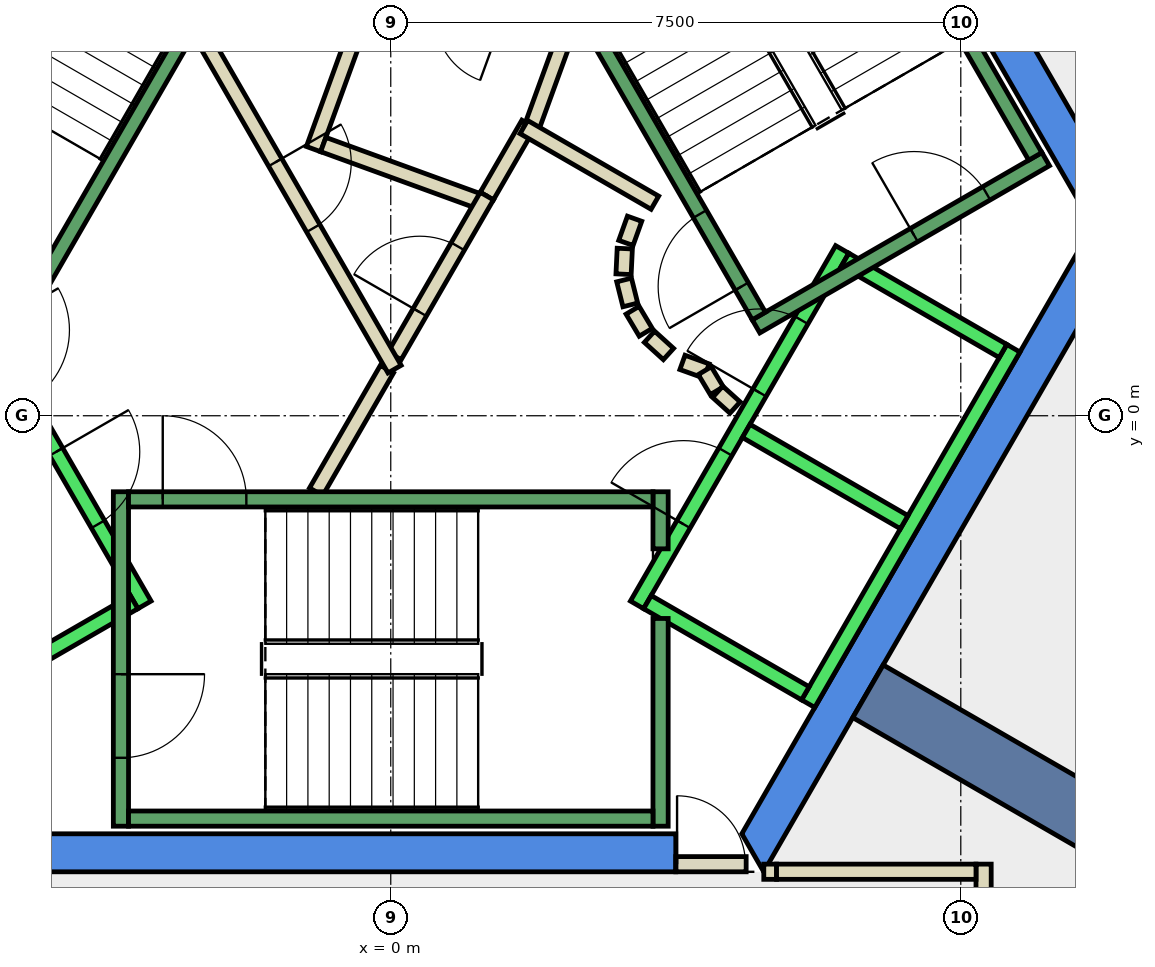
"""IFC4 building model, lengths in metres.
Left out: names, types, materials, properties, quantities, classifications, styles, units other than length and angle.
Written with IfcOpenShell. Run it as: python <this file> out.ifc"""

import sys

from ifc_helpers import new_model, si_unit, direction, frame, frame_2d, origin, place, context, subcontext, project, spatial, polyline, rectangle, outline, extrude, element, fill, save


model = new_model("IFC4")
c1 = context("Model", 3, precision=1e-05, world=origin(), true_north=direction((0.0, 1.0)))
c2 = subcontext(c1, "Body", "Model", "MODEL_VIEW")
j1 = project(units=[si_unit("LENGTHUNIT", "METRE"), si_unit("PLANEANGLEUNIT", "RADIAN")], contexts=[c1])
p1 = place(None, origin())
s1 = spatial("IfcSite", under=j1, at=p1, CompositionType="ELEMENT")
p2 = place(p1, origin())
s2 = spatial("IfcBuilding", under=s1, at=p2, CompositionType="ELEMENT")
p3 = place(p2, frame((0.0, 0.0, 290.0)))
s3 = spatial("IfcBuildingStorey", under=s2, at=p3, CompositionType="ELEMENT", Elevation=290.0)
p4 = place(p3, frame((0.0, 0.0, -0.34)))
e1 = element("IfcWall", 1, at=p4, inside=s3, PredefinedType="SHEAR", context=c2, shape_type="SweptSolid", body=[
    extrude(outline(polyline([(5.486, 9.998), (5.053, 9.748), (9.238, 2.5), (9.815, 2.5), (5.486, 9.998)])), origin(), (0.0, 0.0, 1.0), 3.6),
])
p5 = place(p3, frame((0.0, 0.0, -0.34)))
e2 = element("IfcWall", 2, at=p5, inside=s3, PredefinedType="SHEAR", context=c2, shape_type="SweptSolid", body=[
    extrude(outline(polyline([(3.75, -6.0), (3.75, -5.5), (-4.619, -5.5), (-4.907, -6.0), (3.75, -6.0)])), origin(), (0.0, 0.0, 1.0), 3.6),
])
p6 = place(p3, frame((0.0, 0.0, -0.34)))
e3 = element("IfcWall", 3, at=p6, inside=s3, PredefinedType="SHEAR", context=c2, shape_type="SweptSolid", body=[
    extrude(outline(polyline([(4.907, -6.0), (9.815, 2.5), (9.238, 2.5), (4.619, -5.5), (4.907, -6.0)])), origin(), (0.0, 0.0, 1.0), 3.6),
])
p7 = place(p3, frame((6.279, -3.625, -0.34), z_axis=(0.0, 0.0, 1.0), x_axis=(0.866017533419, -0.500013631625, 0.0)))
e4 = element("IfcWall", 4, at=p7, inside=s3, PredefinedType="SHEAR", context=c2, shape_type="SweptSolid", body=[
    extrude(rectangle(XDim=9.0, YDim=0.8, at=frame_2d((4.5, 0.0))), origin(), (0.0, 0.0, 1.0), 3.6),
])
p8 = place(p3, frame((1.264, 2.89, 0.0), z_axis=(0.0, 0.0, 1.0), x_axis=(0.500043792738, 0.866000118559, 0.0)))
e5 = element("IfcWall", 5, at=p8, inside=s3, PredefinedType="PARTITIONING", context=c2, shape_type="SweptSolid", body=[
    extrude(rectangle(XDim=1.096, YDim=0.2, at=frame_2d((0.548, 0.0))), origin(), (0.0, 0.0, 1.0), 3.26),
])
p9 = place(p3, frame((1.838, 3.748, 0.0), z_axis=(0.0, 0.0, 1.0), x_axis=(0.342266462435, 0.939602931398, 0.0)))
e6 = element("IfcWall", 6, at=p9, inside=s3, PredefinedType="PARTITIONING", context=c2, shape_type="SweptSolid", body=[
    extrude(rectangle(XDim=1.198, YDim=0.2, at=frame_2d((0.599, 0.0))), origin(), (0.0, 0.0, 1.0), 3.26),
])
p10 = place(p3, frame((-0.196, 5.764, 0.0), z_axis=(0.0, 0.0, 1.0), x_axis=(-0.34165322761, -0.939826086073, 0.0)))
e7 = element("IfcWall", 7, at=p10, inside=s3, PredefinedType="PARTITIONING", context=c2, shape_type="SweptSolid", body=[
    extrude(rectangle(XDim=2.4, YDim=0.2, at=frame_2d((1.2, 0.0))), origin(), (0.0, 0.0, 1.0), 3.26),
])
p11 = place(p3, frame((-0.888, 3.568, 0.0), z_axis=(0.0, 0.0, 1.0), x_axis=(0.939685034098, -0.34204098686, 0.0)))
e8 = element("IfcWall", 8, at=p11, inside=s3, PredefinedType="PARTITIONING", context=c2, shape_type="SweptSolid", body=[
    extrude(rectangle(XDim=2.237, YDim=0.2, at=frame_2d((1.119, 0.0))), origin(), (0.0, 0.0, 1.0), 3.26),
])
p12 = place(p3, frame((-0.982, -1.0, 0.0), z_axis=(0.0, 0.0, 1.0), x_axis=(0.50024047865, 0.865886518847, 0.0)))
e9 = element("IfcWall", 9, at=p12, inside=s3, PredefinedType="PARTITIONING", context=c2, shape_type="SweptSolid", body=[
    extrude(rectangle(XDim=1.863, YDim=0.2, at=frame_2d((0.931, 0.0))), origin(), (0.0, 0.0, 1.0), 3.26),
])
p13 = place(p3, frame((0.05, 0.787, 0.0), z_axis=(0.0, 0.0, 1.0), x_axis=(0.499945861543, 0.866056658381, 0.0)))
e10 = element("IfcWall", 10, at=p13, inside=s3, PredefinedType="PARTITIONING", context=c2, shape_type="SweptSolid", body=[
    extrude(rectangle(XDim=2.428, YDim=0.2, at=frame_2d((1.214, 0.0))), origin(), (0.0, 0.0, 1.0), 3.26),
])
p14 = place(p13, frame((0.664, 0.0, 0.0)))
e11 = element("IfcOpeningElement", 11, at=p14, cuts=e10, PredefinedType="OPENING", context=c2, shape_type="SweptSolid", body=[
    extrude(rectangle(XDim=1.0, YDim=2.1, at=frame_2d((0.5, 1.05))), frame((0.0, 0.11, 0.0), z_axis=(0.0, -1.0, 0.0), x_axis=(1.0, 0.0, 0.0)), (0.0, 0.0, 1.0), 0.22),
])
p15 = place(p3, frame((1.751, 3.798, 0.0), z_axis=(0.0, 0.0, 1.0), x_axis=(0.866091650241, -0.499885240213, 0.0)))
e12 = element("IfcWall", 12, at=p15, inside=s3, PredefinedType="PARTITIONING", context=c2, shape_type="SweptSolid", body=[
    extrude(rectangle(XDim=1.991, YDim=0.2, at=frame_2d((0.995, 0.0))), origin(), (0.0, 0.0, 1.0), 3.26),
])
p16 = place(p3, frame((3.208, 2.592, 0.0), z_axis=(0.0, 0.0, 1.0), x_axis=(-0.337388820924, -0.941365382578, 0.0)))
e13 = element("IfcWall", 13, at=p16, inside=s3, PredefinedType="PARTITIONING", context=c2, shape_type="SweptSolid", body=[
    extrude(rectangle(XDim=0.338, YDim=0.2, at=frame_2d((0.169, 0.0))), origin(), (0.0, 0.0, 1.0), 3.26),
])
p17 = place(p3, frame((3.079, 2.199, 0.0), z_axis=(0.0, 0.0, 1.0), x_axis=(-0.047771483479, -0.998858290933, 0.0)))
e14 = element("IfcWall", 14, at=p17, inside=s3, PredefinedType="PARTITIONING", context=c2, shape_type="SweptSolid", body=[
    extrude(rectangle(XDim=0.337, YDim=0.2, at=frame_2d((0.169, 0.0))), origin(), (0.0, 0.0, 1.0), 3.26),
])
p18 = place(p3, frame((3.07, 1.786, 0.0), z_axis=(0.0, 0.0, 1.0), x_axis=(0.242705583207, -0.970099994784, 0.0)))
e15 = element("IfcWall", 15, at=p18, inside=s3, PredefinedType="PARTITIONING", context=c2, shape_type="SweptSolid", body=[
    extrude(rectangle(XDim=0.338, YDim=0.2, at=frame_2d((0.169, 0.0))), origin(), (0.0, 0.0, 1.0), 3.26),
])
for number, where, z_axis, x_axis in (
    (16, (3.182, 1.388, 0.0), (0.0, 0.0, 1.0), (0.512, -0.859, 0.0)),
    (17, (3.404, 1.039, 0.0), (0.0, 0.0, 1.0), (0.74, -0.672, 0.0)),
):
    element("IfcWall", number, at=place(p3, frame(where, z_axis=z_axis, x_axis=x_axis)), inside=s3, PredefinedType="PARTITIONING", context=c2, shape_type="SweptSolid", body=[
        extrude(rectangle(XDim=0.338, YDim=0.2, at=frame_2d((0.169, 0.0))), origin(), (0.0, 0.0, 1.0), 3.26),
    ])
p19 = place(p3, frame((3.838, 0.702, 0.0), z_axis=(0.0, 0.0, 1.0), x_axis=(0.941035081519, -0.338308993895, 0.0)))
e18 = element("IfcWall", 18, at=p19, inside=s3, PredefinedType="PARTITIONING", context=c2, shape_type="SweptSolid", body=[
    extrude(rectangle(XDim=0.337, YDim=0.2, at=frame_2d((0.168, 0.0))), origin(), (0.0, 0.0, 1.0), 3.26),
])
p20 = place(p3, frame((4.132, 0.593, 0.0), z_axis=(0.0, 0.0, 1.0), x_axis=(0.513561617048, -0.858052717201, 0.0)))
e19 = element("IfcWall", 19, at=p20, inside=s3, PredefinedType="PARTITIONING", context=c2, shape_type="SweptSolid", body=[
    extrude(rectangle(XDim=0.308, YDim=0.2, at=frame_2d((0.154, 0.0))), origin(), (0.0, 0.0, 1.0), 3.26),
])
p21 = place(p3, frame((4.301, 0.315, 0.0), z_axis=(0.0, 0.0, 1.0), x_axis=(0.741798017506, -0.670623367639, 0.0)))
e20 = element("IfcWall", 20, at=p21, inside=s3, PredefinedType="PARTITIONING", context=c2, shape_type="SweptSolid", body=[
    extrude(rectangle(XDim=0.309, YDim=0.2, at=frame_2d((0.154, 0.0))), origin(), (0.0, 0.0, 1.0), 3.26),
])
p22 = place(p3, frame((-2.54, 5.1, 0.0), z_axis=(0.0, 0.0, 1.0), x_axis=(0.499925051871, -0.866068670783, 0.0)))
e21 = element("IfcWall", 21, at=p22, inside=s3, PredefinedType="PARTITIONING", context=c2, shape_type="SweptSolid", body=[
    extrude(rectangle(XDim=5.181, YDim=0.2, at=frame_2d((2.59, 0.0))), origin(), (0.0, 0.0, 1.0), 3.26),
])
p23 = place(p22, frame((2.04, 0.0, 0.0)))
e22 = element("IfcOpeningElement", 22, at=p23, cuts=e21, PredefinedType="OPENING", context=c2, shape_type="SweptSolid", body=[
    extrude(rectangle(XDim=1.0, YDim=2.1, at=frame_2d((0.5, 1.05))), frame((0.0, 0.11, 0.0), z_axis=(0.0, -1.0, 0.0), x_axis=(1.0, 0.0, 0.0)), (0.0, 0.0, 1.0), 0.22),
])
p24 = place(p3, frame((4.908, -5.999, 0.0), z_axis=(0.0, 0.0, 1.0), x_axis=(1.0, 0.0, 0.0)))
e23 = element("IfcWall", 23, at=p24, inside=s3, PredefinedType="PARTITIONING", context=c2, shape_type="SweptSolid", body=[
    extrude(rectangle(XDim=0.168, YDim=0.2, at=frame_2d((0.084, 0.0))), origin(), (0.0, 0.0, 1.0), 2.4),
])
p25 = place(p3, frame((7.8, -5.899, 0.0), z_axis=(0.0, 0.0, 1.0), x_axis=(0.0, -1.0, 0.0)))
e24 = element("IfcWall", 24, at=p25, inside=s3, PredefinedType="PARTITIONING", context=c2, shape_type="SweptSolid", body=[
    extrude(rectangle(XDim=3.876, YDim=0.2, at=frame_2d((1.938, 0.0))), origin(), (0.0, 0.0, 1.0), 3.26),
])
p26 = place(p3, frame((3.75, -5.9, 0.0), z_axis=(0.0, 0.0, 1.0), x_axis=(1.0, 0.0, 0.0)))
e25 = element("IfcWall", 25, at=p26, inside=s3, PredefinedType="PARTITIONING", context=c2, shape_type="SweptSolid", body=[
    extrude(rectangle(XDim=0.926, YDim=0.2, at=frame_2d((0.463, 0.0))), origin(), (0.0, 0.0, 1.0), 2.4),
])
p27 = place(p26, frame((0.017, 0.0, 0.0)))
e26 = element("IfcOpeningElement", 26, at=p27, cuts=e25, PredefinedType="OPENING", context=c2, shape_type="SweptSolid", body=[
    extrude(rectangle(XDim=0.9, YDim=2.1, at=frame_2d((0.45, 1.05))), frame((0.0, 0.11, 0.0), z_axis=(0.0, -1.0, 0.0), x_axis=(1.0, 0.0, 0.0)), (0.0, 0.0, 1.0), 0.22),
])
p28 = place(p3, frame((5.076, -5.999, 0.0), z_axis=(0.0, 0.0, 1.0), x_axis=(1.0, 0.0, 0.0)))
e27 = element("IfcWall", 27, at=p28, inside=s3, PredefinedType="PARTITIONING", context=c2, shape_type="SweptSolid", body=[
    extrude(rectangle(XDim=2.624, YDim=0.2, at=frame_2d((1.312, 0.0))), origin(), (0.0, 0.0, 1.0), 3.26),
])
p29 = place(p3, frame((-5.94, 2.188, 0.0), z_axis=(0.0, 0.0, 1.0), x_axis=(0.500034260056, -0.866005622828, 0.0)))
e28 = element("IfcWall", 28, at=p29, inside=s3, PredefinedType="STANDARD", context=c2, shape_type="SweptSolid", body=[
    extrude(rectangle(XDim=5.399, YDim=0.2, at=frame_2d((2.7, 0.0))), origin(), (0.0, 0.0, 1.0), 3.26),
])
p30 = place(p29, frame((3.075, 0.0, 0.0)))
e29 = element("IfcOpeningElement", 29, at=p30, cuts=e28, PredefinedType="OPENING", context=c2, shape_type="SweptSolid", body=[
    extrude(rectangle(XDim=1.1, YDim=2.1, at=frame_2d((0.55, 1.05))), frame((0.0, 0.11, 0.0), z_axis=(0.0, -1.0, 0.0), x_axis=(1.0, 0.0, 0.0)), (0.0, 0.0, 1.0), 0.22),
])
p31 = place(p29, frame((1.225, 0.0, 0.0)))
e30 = element("IfcOpeningElement", 30, at=p31, cuts=e28, PredefinedType="OPENING", context=c2, shape_type="SweptSolid", body=[
    extrude(rectangle(XDim=1.1, YDim=2.1, at=frame_2d((0.55, 1.05))), frame((0.0, 0.11, 0.0), z_axis=(0.0, -1.0, 0.0), x_axis=(1.0, 0.0, 0.0)), (0.0, 0.0, 1.0), 0.22),
])
p32 = place(p3, frame((-3.377, -2.452, 0.0), z_axis=(0.0, 0.0, 1.0), x_axis=(-0.865955154139, -0.50012165622, 0.0)))
e31 = element("IfcWall", 31, at=p32, inside=s3, PredefinedType="STANDARD", context=c2, shape_type="SweptSolid", body=[
    extrude(rectangle(XDim=2.4, YDim=0.2, at=frame_2d((1.2, 0.0))), origin(), (0.0, 0.0, 1.0), 3.26),
])
p33 = place(p3, frame((3.24, -2.488, 0.0), z_axis=(0.0, 0.0, 1.0), x_axis=(0.500034260056, 0.866005622828, 0.0)))
e32 = element("IfcWall", 32, at=p33, inside=s3, PredefinedType="STANDARD", context=c2, shape_type="SweptSolid", body=[
    extrude(rectangle(XDim=5.399, YDim=0.2, at=frame_2d((2.7, 0.0))), origin(), (0.0, 0.0, 1.0), 3.26),
])
p34 = place(p33, frame((3.225, 0.0, 0.0)))
e33 = element("IfcOpeningElement", 33, at=p34, cuts=e32, PredefinedType="OPENING", context=c2, shape_type="SweptSolid", body=[
    extrude(rectangle(XDim=1.1, YDim=2.1, at=frame_2d((0.55, 1.05))), frame((0.0, 0.11, 0.0), z_axis=(0.0, -1.0, 0.0), x_axis=(1.0, 0.0, 0.0)), (0.0, 0.0, 1.0), 0.22),
])
p35 = place(p33, frame((1.225, 0.0, 0.0)))
e34 = element("IfcOpeningElement", 34, at=p35, cuts=e32, PredefinedType="OPENING", context=c2, shape_type="SweptSolid", body=[
    extrude(rectangle(XDim=1.1, YDim=2.1, at=frame_2d((0.55, 1.05))), frame((0.0, 0.11, 0.0), z_axis=(0.0, -1.0, 0.0), x_axis=(1.0, 0.0, 0.0)), (0.0, 0.0, 1.0), 0.22),
])
p36 = place(p3, frame((5.492, -3.788, 0.0), z_axis=(0.0, 0.0, 1.0), x_axis=(0.500034260056, 0.866005622828, 0.0)))
e35 = element("IfcWall", 35, at=p36, inside=s3, PredefinedType="STANDARD", context=c2, shape_type="SweptSolid", body=[
    extrude(rectangle(XDim=5.399, YDim=0.2, at=frame_2d((2.7, 0.0))), origin(), (0.0, 0.0, 1.0), 3.26),
])
p37 = place(p3, frame((3.377, -2.452, 0.0), z_axis=(0.0, 0.0, 1.0), x_axis=(0.865955154139, -0.50012165622, 0.0)))
e36 = element("IfcWall", 36, at=p37, inside=s3, PredefinedType="STANDARD", context=c2, shape_type="SweptSolid", body=[
    extrude(rectangle(XDim=2.4, YDim=0.2, at=frame_2d((1.2, 0.0))), origin(), (0.0, 0.0, 1.0), 3.26),
])
for number, where, z_axis, x_axis in (
    (37, (4.677, -0.2, 0.0), (0.0, 0.0, 1.0), (0.866, -0.5, 0.0)),
    (38, (5.977, 2.052, 0.0), (0.0, 0.0, 1.0), (0.866, -0.5, 0.0)),
):
    element("IfcWall", number, at=place(p3, frame(where, z_axis=z_axis, x_axis=x_axis)), inside=s3, PredefinedType="STANDARD", context=c2, shape_type="SweptSolid", body=[
        extrude(rectangle(XDim=2.399, YDim=0.2, at=frame_2d((1.2, 0.0))), origin(), (0.0, 0.0, 1.0), 3.26),
    ])
p38 = place(p3, frame((-3.55, -1.0, 0.0), z_axis=(0.0, 0.0, 1.0), x_axis=(0.0, -1.0, 0.0)))
e39 = element("IfcWall", 39, at=p38, inside=s3, PredefinedType="STANDARD", context=c2, shape_type="SweptSolid", body=[
    extrude(rectangle(XDim=4.4, YDim=0.2, at=frame_2d((2.2, 0.0))), origin(), (0.0, 0.0, 1.0), 3.26),
])
p39 = place(p38, frame((2.4, 0.0, 0.0)))
e40 = element("IfcOpeningElement", 40, at=p39, cuts=e39, PredefinedType="OPENING", context=c2, shape_type="SweptSolid", body=[
    extrude(rectangle(XDim=1.1, YDim=2.2, at=frame_2d((0.55, 1.1))), frame((0.0, 0.11, 0.0), z_axis=(0.0, -1.0, 0.0), x_axis=(1.0, 0.0, 0.0)), (0.0, 0.0, 1.0), 0.22),
])
p40 = place(p3, frame((3.55, -2.667, 0.0), z_axis=(0.0, 0.0, 1.0), x_axis=(0.0, -1.0, 0.0)))
e41 = element("IfcWall", 41, at=p40, inside=s3, PredefinedType="STANDARD", context=c2, shape_type="SweptSolid", body=[
    extrude(rectangle(XDim=2.733, YDim=0.2, at=frame_2d((1.366, 0.0))), origin(), (0.0, 0.0, 1.0), 3.26),
])
p41 = place(p3, frame((3.55, -1.0, 0.0), z_axis=(0.0, 0.0, 1.0), x_axis=(0.0, -1.0, 0.0)))
e42 = element("IfcWall", 42, at=p41, inside=s3, PredefinedType="STANDARD", context=c2, shape_type="SweptSolid", body=[
    extrude(rectangle(XDim=0.751, YDim=0.2, at=frame_2d((0.375, 0.0))), origin(), (0.0, 0.0, 1.0), 3.26),
])
p42 = place(p3, frame((-3.45, -1.1, 0.0), z_axis=(0.0, 0.0, 1.0), x_axis=(1.0, 0.0, 0.0)))
e43 = element("IfcWall", 43, at=p42, inside=s3, PredefinedType="STANDARD", context=c2, shape_type="SweptSolid", body=[
    extrude(rectangle(XDim=6.9, YDim=0.2, at=frame_2d((3.45, 0.0))), origin(), (0.0, 0.0, 1.0), 3.26),
])
p43 = place(p42, frame((0.45, 0.0, 0.0)))
e44 = element("IfcOpeningElement", 44, at=p43, cuts=e43, PredefinedType="OPENING", context=c2, shape_type="SweptSolid", body=[
    extrude(rectangle(XDim=1.1, YDim=2.2, at=frame_2d((0.55, 1.1))), frame((0.0, 0.11, 0.0), z_axis=(0.0, -1.0, 0.0), x_axis=(1.0, 0.0, 0.0)), (0.0, 0.0, 1.0), 0.22),
])
p44 = place(p3, frame((-3.45, -5.3, 0.0), z_axis=(0.0, 0.0, 1.0), x_axis=(1.0, 0.0, 0.0)))
e45 = element("IfcWall", 45, at=p44, inside=s3, PredefinedType="STANDARD", context=c2, shape_type="SweptSolid", body=[
    extrude(rectangle(XDim=6.9, YDim=0.2, at=frame_2d((3.45, 0.0))), origin(), (0.0, 0.0, 1.0), 3.26),
])
p45 = place(p3, frame((4.806, 1.176, 0.0), z_axis=(0.0, 0.0, 1.0), x_axis=(0.866059941101, 0.499940174841, 0.0)))
e46 = element("IfcWall", 46, at=p45, inside=s3, PredefinedType="STANDARD", context=c2, shape_type="SweptSolid", body=[
    extrude(rectangle(XDim=4.4, YDim=0.2, at=frame_2d((2.2, 0.0))), origin(), (0.0, 0.0, 1.0), 3.26),
])
p46 = place(p45, frame((2.4, 0.0, 0.0)))
e47 = element("IfcOpeningElement", 47, at=p46, cuts=e46, PredefinedType="OPENING", context=c2, shape_type="SweptSolid", body=[
    extrude(rectangle(XDim=1.1, YDim=2.2, at=frame_2d((0.55, 1.1))), frame((0.0, 0.11, 0.0), z_axis=(0.0, -1.0, 0.0), x_axis=(1.0, 0.0, 0.0)), (0.0, 0.0, 1.0), 0.22),
])
p47 = place(p3, frame((4.843, 1.312, 0.0), z_axis=(0.0, 0.0, 1.0), x_axis=(-0.499963383562, 0.866046543262, 0.0)))
e48 = element("IfcWall", 48, at=p47, inside=s3, PredefinedType="STANDARD", context=c2, shape_type="SweptSolid", body=[
    extrude(rectangle(XDim=6.9, YDim=0.2, at=frame_2d((3.45, 0.0))), origin(), (0.0, 0.0, 1.0), 3.26),
])
p48 = place(p47, frame((0.45, 0.0, 0.0)))
e49 = element("IfcOpeningElement", 49, at=p48, cuts=e48, PredefinedType="OPENING", context=c2, shape_type="SweptSolid", body=[
    extrude(rectangle(XDim=1.1, YDim=2.2, at=frame_2d((0.55, 1.1))), frame((0.0, 0.11, 0.0), z_axis=(0.0, -1.0, 0.0), x_axis=(1.0, 0.0, 0.0)), (0.0, 0.0, 1.0), 0.22),
])
p49 = place(p3, frame((8.48, 3.412, 0.0), z_axis=(0.0, 0.0, 1.0), x_axis=(-0.499978703459, 0.866037698999, 0.0)))
e50 = element("IfcWall", 50, at=p49, inside=s3, PredefinedType="STANDARD", context=c2, shape_type="SweptSolid", body=[
    extrude(rectangle(XDim=6.9, YDim=0.2, at=frame_2d((3.45, 0.0))), origin(), (0.0, 0.0, 1.0), 3.26),
])
p50 = place(p3, frame((-1.393, 7.288, 0.0), z_axis=(0.0, 0.0, 1.0), x_axis=(-0.499963383562, -0.866046543262, 0.0)))
e51 = element("IfcWall", 51, at=p50, inside=s3, PredefinedType="STANDARD", context=c2, shape_type="SweptSolid", body=[
    extrude(rectangle(XDim=6.9, YDim=0.2, at=frame_2d((3.45, 0.0))), origin(), (0.0, 0.0, 1.0), 3.26),
])
p51 = place(p50, frame((0.45, 0.0, 0.0)))
e52 = element("IfcOpeningElement", 52, at=p51, cuts=e51, PredefinedType="OPENING", context=c2, shape_type="SweptSolid", body=[
    extrude(rectangle(XDim=1.1, YDim=2.2, at=frame_2d((0.55, 1.1))), frame((0.0, 0.11, 0.0), z_axis=(0.0, -1.0, 0.0), x_axis=(1.0, 0.0, 0.0)), (0.0, 0.0, 1.0), 0.22),
])
p52 = place(p14, origin())
e53 = element("IfcDoor", 53, at=p52, inside=s3, OperationType="SINGLE_SWING_RIGHT", PredefinedType="DOOR", context=c2, shape_type="SweptSolid", body=[
    extrude(rectangle(XDim=1.0, YDim=2.1, at=frame_2d((0.5, 1.05))), frame((0.0, 0.025, 0.0), z_axis=(0.0, -1.0, 0.0), x_axis=(1.0, 0.0, 0.0)), (0.0, 0.0, 1.0), 0.05),
])
fill(e11, e53)
p53 = place(p23, origin())
e54 = element("IfcDoor", 54, at=p53, inside=s3, OperationType="SINGLE_SWING_RIGHT", PredefinedType="DOOR", context=c2, shape_type="SweptSolid", body=[
    extrude(rectangle(XDim=1.0, YDim=2.1, at=frame_2d((0.5, 1.05))), frame((0.0, 0.025, 0.0), z_axis=(0.0, -1.0, 0.0), x_axis=(1.0, 0.0, 0.0)), (0.0, 0.0, 1.0), 0.05),
])
fill(e22, e54)
p54 = place(p27, origin())
e55 = element("IfcDoor", 55, at=p54, inside=s3, OperationType="SINGLE_SWING_LEFT", PredefinedType="DOOR", context=c2, shape_type="SweptSolid", body=[
    extrude(rectangle(XDim=0.9, YDim=2.1, at=frame_2d((0.45, 1.05))), frame((0.0, 0.025, 0.0), z_axis=(0.0, -1.0, 0.0), x_axis=(1.0, 0.0, 0.0)), (0.0, 0.0, 1.0), 0.05),
])
fill(e26, e55)
p55 = place(p34, origin())
e56 = element("IfcDoor", 56, at=p55, inside=s3, OperationType="SLIDING_TO_LEFT", PredefinedType="DOOR", context=c2, shape_type="SweptSolid", body=[
    extrude(rectangle(XDim=1.1, YDim=2.1, at=frame_2d((0.55, 1.05))), frame((0.0, 0.025, 0.0), z_axis=(0.0, -1.0, 0.0), x_axis=(1.0, 0.0, 0.0)), (0.0, 0.0, 1.0), 0.05),
])
fill(e33, e56)
p56 = place(p30, origin())
e57 = element("IfcDoor", 57, at=p56, inside=s3, OperationType="SLIDING_TO_LEFT", PredefinedType="DOOR", context=c2, shape_type="SweptSolid", body=[
    extrude(rectangle(XDim=1.1, YDim=2.1, at=frame_2d((0.55, 1.05))), frame((0.0, 0.025, 0.0), z_axis=(0.0, -1.0, 0.0), x_axis=(1.0, 0.0, 0.0)), (0.0, 0.0, 1.0), 0.05),
])
fill(e29, e57)
p57 = place(p35, origin())
e58 = element("IfcDoor", 58, at=p57, inside=s3, OperationType="SLIDING_TO_LEFT", PredefinedType="DOOR", context=c2, shape_type="SweptSolid", body=[
    extrude(rectangle(XDim=1.1, YDim=2.1, at=frame_2d((0.55, 1.05))), frame((0.0, 0.025, 0.0), z_axis=(0.0, -1.0, 0.0), x_axis=(1.0, 0.0, 0.0)), (0.0, 0.0, 1.0), 0.05),
])
fill(e34, e58)
p58 = place(p43, origin())
e59 = element("IfcDoor", 59, at=p58, inside=s3, OperationType="SINGLE_SWING_LEFT", PredefinedType="DOOR", context=c2, shape_type="SweptSolid", body=[
    extrude(rectangle(XDim=1.1, YDim=2.2, at=frame_2d((0.55, 1.1))), frame((0.0, 0.025, 0.0), z_axis=(0.0, -1.0, 0.0), x_axis=(1.0, 0.0, 0.0)), (0.0, 0.0, 1.0), 0.05),
])
fill(e44, e59)
p59 = place(p39, origin())
e60 = element("IfcDoor", 60, at=p59, inside=s3, OperationType="SINGLE_SWING_LEFT", PredefinedType="DOOR", context=c2, shape_type="SweptSolid", body=[
    extrude(rectangle(XDim=1.1, YDim=2.2, at=frame_2d((0.55, 1.1))), frame((0.0, 0.025, 0.0), z_axis=(0.0, -1.0, 0.0), x_axis=(1.0, 0.0, 0.0)), (0.0, 0.0, 1.0), 0.05),
])
fill(e40, e60)
p60 = place(p48, origin())
e61 = element("IfcDoor", 61, at=p60, inside=s3, OperationType="SINGLE_SWING_LEFT", PredefinedType="DOOR", context=c2, shape_type="SweptSolid", body=[
    extrude(rectangle(XDim=1.1, YDim=2.2, at=frame_2d((0.55, 1.1))), frame((0.0, 0.025, 0.0), z_axis=(0.0, -1.0, 0.0), x_axis=(1.0, 0.0, 0.0)), (0.0, 0.0, 1.0), 0.05),
])
fill(e49, e61)
p61 = place(p46, origin())
e62 = element("IfcDoor", 62, at=p61, inside=s3, OperationType="SINGLE_SWING_LEFT", PredefinedType="DOOR", context=c2, shape_type="SweptSolid", body=[
    extrude(rectangle(XDim=1.1, YDim=2.2, at=frame_2d((0.55, 1.1))), frame((0.0, 0.025, 0.0), z_axis=(0.0, -1.0, 0.0), x_axis=(1.0, 0.0, 0.0)), (0.0, 0.0, 1.0), 0.05),
])
fill(e47, e62)
save(model, sys.argv[1])
